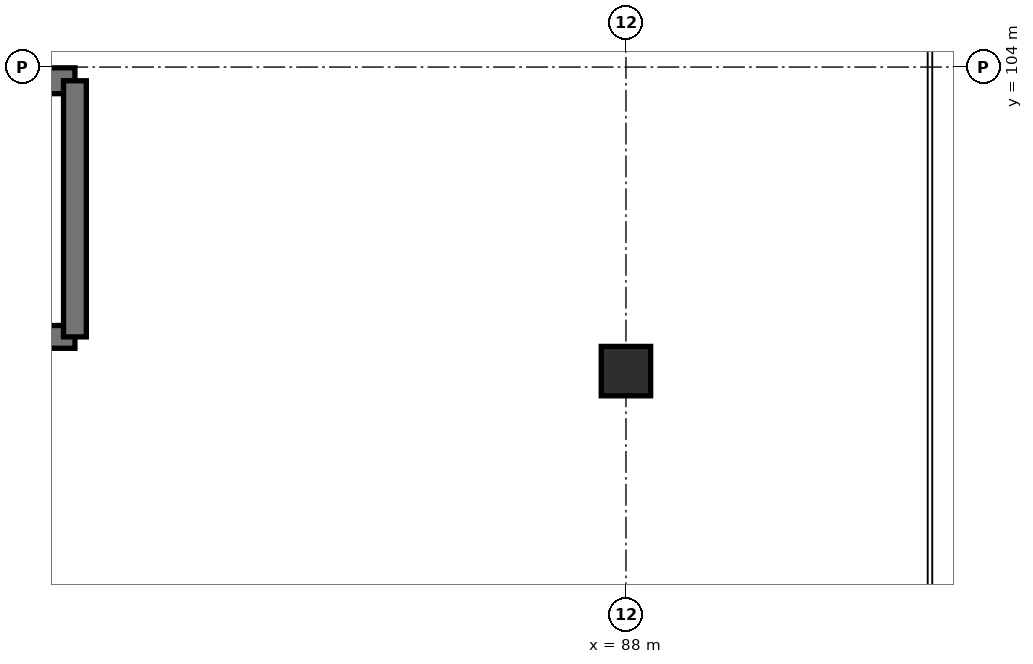
"""IFC4 building model, lengths in metres.
Left out: names, types, materials, properties, quantities, classifications, styles, units other than length and angle.
Written with IfcOpenShell. Run it as: python <this file> out.ifc"""

import sys

from ifc_helpers import new_model, si_unit, direction, frame, frame_2d, origin, origin_2d, place, context, subcontext, project, spatial, rectangle, extrude, element, save


model = new_model("IFC4")
c1 = context("Model", 3, precision=1e-05, world=origin(), true_north=direction((0.0, 1.0)))
c2 = subcontext(c1, "Body", "Model", "MODEL_VIEW")
j1 = project(units=[si_unit("LENGTHUNIT", "METRE"), si_unit("PLANEANGLEUNIT", "RADIAN")], contexts=[c1])
p1 = place(None, origin())
s1 = spatial("IfcSite", under=j1, at=p1, CompositionType="ELEMENT")
p2 = place(p1, origin())
s2 = spatial("IfcBuilding", under=s1, at=p2, CompositionType="ELEMENT")
p3 = place(p2, frame((0.0, 0.0, -3.84)))
s3 = spatial("IfcBuildingStorey", under=s2, at=p3, CompositionType="ELEMENT", Elevation=-3.84)
p4 = place(p3, frame((88.0, 100.0, 0.0), z_axis=(0.0, 0.0, 1.0), x_axis=(1.0, 0.0, 0.0)))
e1 = element("IfcColumn", 1, at=p4, inside=s3, PredefinedType="COLUMN", context=c2, shape_type="SweptSolid", body=[
    extrude(rectangle(XDim=0.65, YDim=0.65, at=origin_2d()), origin(), (0.0, 0.0, 1.0), 3.84),
])
p5 = place(p3, frame((73.85, 100.45, 0.0), z_axis=(0.0, 0.0, 1.0), x_axis=(1.0, 0.0, 0.0)))
e2 = element("IfcWall", 2, at=p5, inside=s3, PredefinedType="SHEAR", context=c2, shape_type="SweptSolid", body=[
    extrude(rectangle(XDim=6.9, YDim=0.3, at=frame_2d((3.45, 0.0))), origin(), (0.0, 0.0, 1.0), 3.84),
])
p6 = place(p3, frame((80.75, 103.82, 0.0), z_axis=(0.0, 0.0, 1.0), x_axis=(-1.0, 0.0, 0.0)))
e3 = element("IfcWall", 3, at=p6, inside=s3, PredefinedType="SHEAR", context=c2, shape_type="SweptSolid", body=[
    extrude(rectangle(XDim=6.9, YDim=0.34, at=frame_2d((3.45, 0.0))), origin(), (0.0, 0.0, 1.0), 3.84),
])
p7 = place(p3, frame((80.75, 100.45, 0.0), z_axis=(0.0, 0.0, 1.0), x_axis=(0.0, 1.0, 0.0)))
e4 = element("IfcWall", 4, at=p7, inside=s3, PredefinedType="SHEAR", context=c2, shape_type="SweptSolid", body=[
    extrude(rectangle(XDim=3.37, YDim=0.3, at=frame_2d((1.685, 0.0))), origin(), (0.0, 0.0, 1.0), 3.84),
])
save(model, sys.argv[1])
